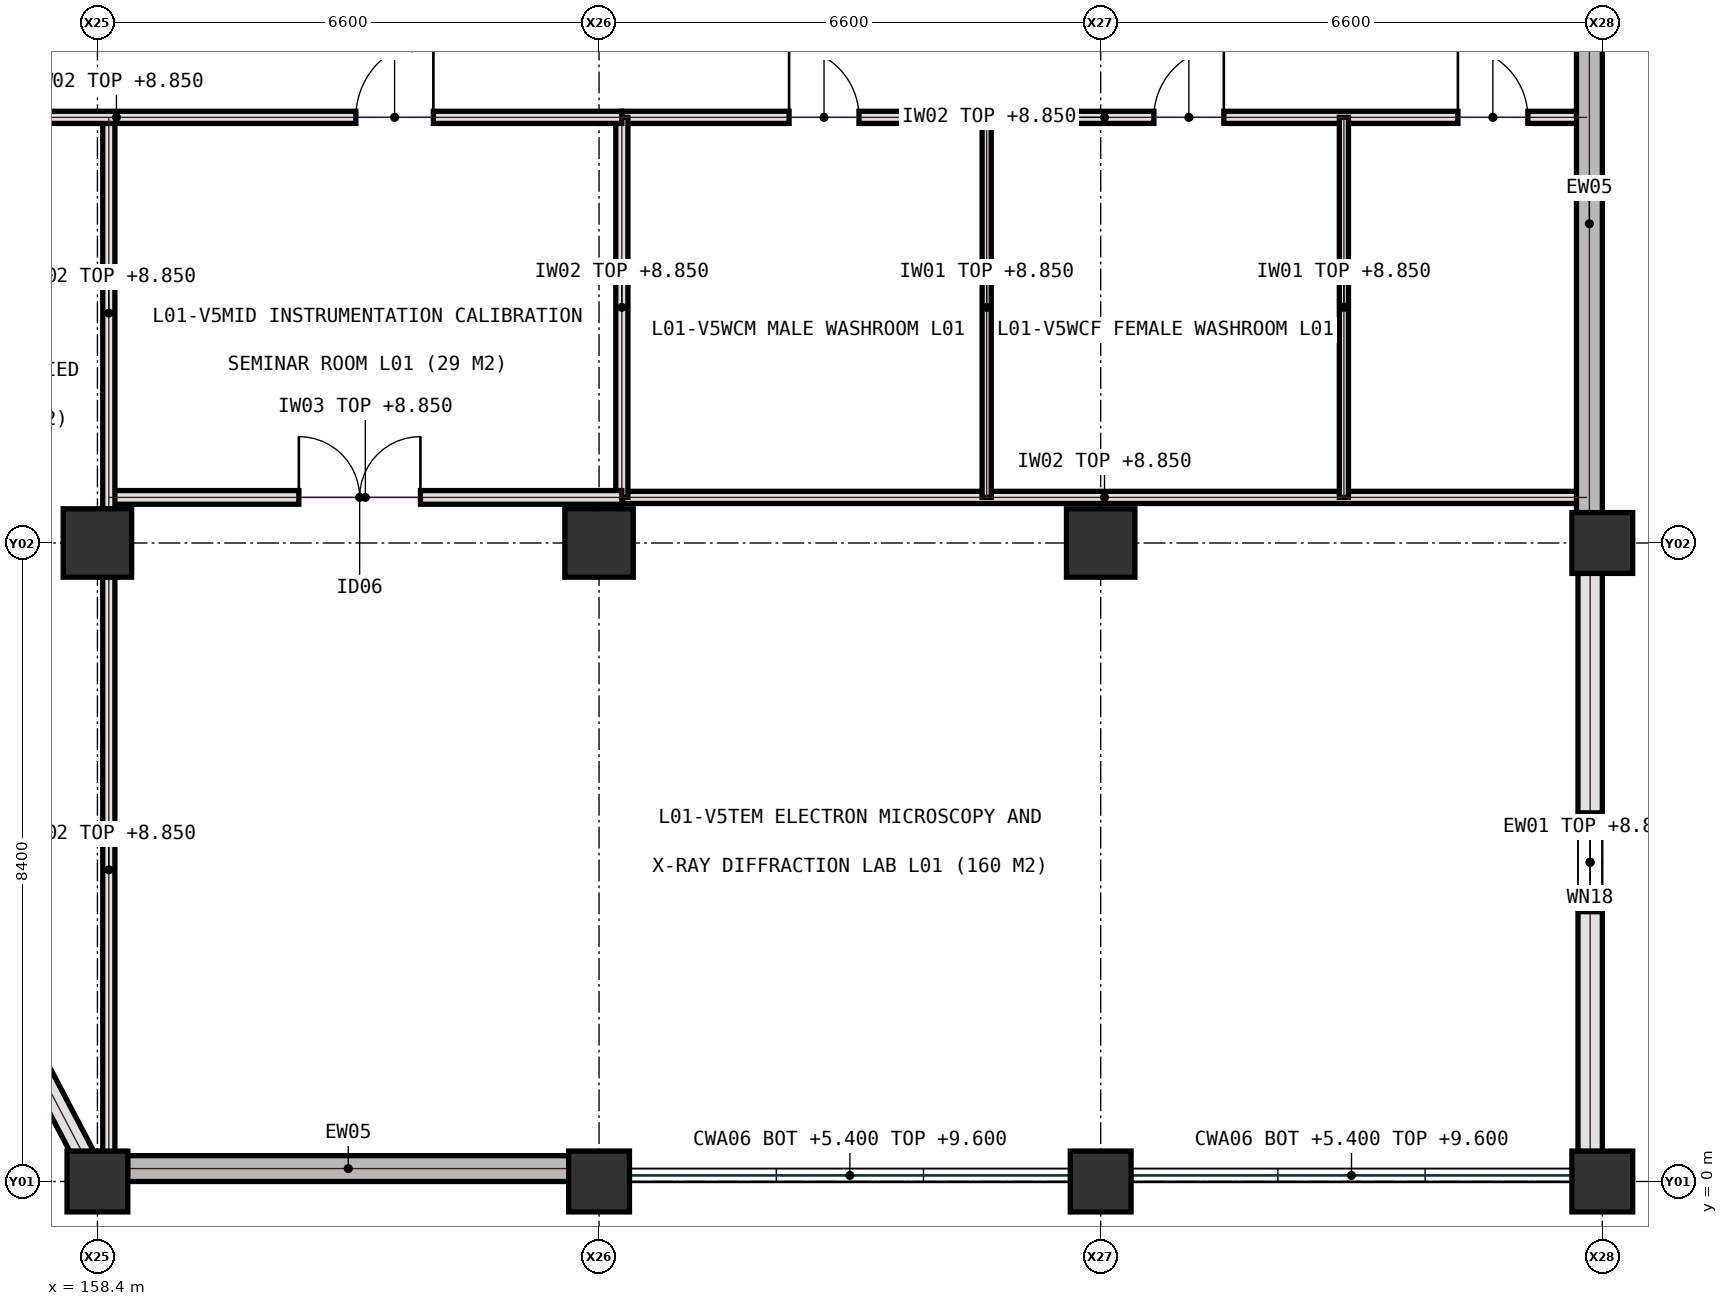
"""IFC4 building model, lengths in metres.
Left out: names, types, materials, properties, quantities, classifications, styles, units other than length and angle.
Written with IfcOpenShell. Run it as: python <this file> out.ifc"""

import sys

from ifc_helpers import new_model, si_unit, direction, frame, frame_2d, origin, origin_2d, place, context, subcontext, project, spatial, rectangle, extrude, element, fill, save


model = new_model("IFC4")
c1 = context("Model", 3, precision=1e-05, world=origin(), true_north=direction((0.0, 1.0)))
c2 = subcontext(c1, "Body", "Model", "MODEL_VIEW")
j1 = project(units=[si_unit("LENGTHUNIT", "METRE"), si_unit("PLANEANGLEUNIT", "RADIAN")], contexts=[c1])
p1 = place(None, origin())
s1 = spatial("IfcSite", under=j1, at=p1, CompositionType="ELEMENT")
p2 = place(p1, origin())
s2 = spatial("IfcBuilding", under=s1, at=p2, CompositionType="ELEMENT")
p3 = place(p2, frame((0.0, 0.0, 5.4)))
s3 = spatial("IfcBuildingStorey", under=s2, at=p3, CompositionType="ELEMENT", Elevation=5.4)
p4 = place(p3, frame((158.4, 0.0, 0.0), z_axis=(0.0, 0.0, 1.0), x_axis=(1.0, 0.0, 0.0)))
e1 = element("IfcColumn", 1, at=p4, inside=s3, PredefinedType="COLUMN", context=c2, shape_type="SweptSolid", body=[
    extrude(rectangle(XDim=0.8, YDim=0.8, at=origin_2d()), origin(), (0.0, 0.0, 1.0), 4.5),
])
p5 = place(p3, frame((158.4, 8.4, 0.0), z_axis=(0.0, 0.0, 1.0), x_axis=(1.0, 0.0, 0.0)))
e2 = element("IfcColumn", 2, at=p5, inside=s3, PredefinedType="COLUMN", context=c2, shape_type="SweptSolid", body=[
    extrude(rectangle(XDim=0.9, YDim=0.9, at=origin_2d()), origin(), (0.0, 0.0, 1.0), 4.5),
])
p6 = place(p3, frame((165.0, 0.0, 0.0), z_axis=(0.0, 0.0, 1.0), x_axis=(1.0, 0.0, 0.0)))
e3 = element("IfcColumn", 3, at=p6, inside=s3, PredefinedType="COLUMN", context=c2, shape_type="SweptSolid", body=[
    extrude(rectangle(XDim=0.8, YDim=0.8, at=origin_2d()), origin(), (0.0, 0.0, 1.0), 4.5),
])
p7 = place(p3, frame((165.0, 8.4, 0.0), z_axis=(0.0, 0.0, 1.0), x_axis=(1.0, 0.0, 0.0)))
e4 = element("IfcColumn", 4, at=p7, inside=s3, PredefinedType="COLUMN", context=c2, shape_type="SweptSolid", body=[
    extrude(rectangle(XDim=0.9, YDim=0.9, at=origin_2d()), origin(), (0.0, 0.0, 1.0), 4.5),
])
p8 = place(p3, frame((171.6, 0.0, 0.0), z_axis=(0.0, 0.0, 1.0), x_axis=(1.0, 0.0, 0.0)))
e5 = element("IfcColumn", 5, at=p8, inside=s3, PredefinedType="COLUMN", context=c2, shape_type="SweptSolid", body=[
    extrude(rectangle(XDim=0.8, YDim=0.8, at=origin_2d()), origin(), (0.0, 0.0, 1.0), 4.5),
])
p9 = place(p3, frame((171.6, 8.4, 0.0), z_axis=(0.0, 0.0, 1.0), x_axis=(1.0, 0.0, 0.0)))
e6 = element("IfcColumn", 6, at=p9, inside=s3, PredefinedType="COLUMN", context=c2, shape_type="SweptSolid", body=[
    extrude(rectangle(XDim=0.9, YDim=0.9, at=origin_2d()), origin(), (0.0, 0.0, 1.0), 4.5),
])
for number, where, z_axis, x_axis in (
    (7, (178.2, 0.0, 0.0), (0.0, 0.0, 1.0), (1.0, 0.0, 0.0)),
    (8, (178.2, 8.4, 0.0), (0.0, 0.0, 1.0), (1.0, 0.0, 0.0)),
):
    element("IfcColumn", number, at=place(p3, frame(where, z_axis=z_axis, x_axis=x_axis)), inside=s3, PredefinedType="COLUMN", context=c2, shape_type="SweptSolid", body=[
        extrude(rectangle(XDim=0.8, YDim=0.8, at=origin_2d()), origin(), (0.0, 0.0, 1.0), 4.5),
    ])
p10 = place(p3, frame((165.3, 14.0, 0.0), z_axis=(0.0, 0.0, 1.0), x_axis=(1.0, 0.0, 0.0)))
e9 = element("IfcWall", 9, at=p10, inside=s3, PredefinedType="PARTITIONING", context=c2, shape_type="SweptSolid", body=[
    extrude(rectangle(XDim=12.7, YDim=0.16, at=frame_2d((6.35, 0.0))), origin(), (0.0, 0.0, 1.0), 3.45),
])
p11 = place(p10, frame((2.2, 0.0, 0.0)))
e10 = element("IfcOpeningElement", 10, at=p11, cuts=e9, PredefinedType="OPENING", context=c2, shape_type="SweptSolid", body=[
    extrude(rectangle(XDim=0.92, YDim=2.08, at=frame_2d((0.46, 1.04))), frame((0.0, 0.09, 0.0), z_axis=(0.0, -1.0, 0.0), x_axis=(1.0, 0.0, 0.0)), (0.0, 0.0, 1.0), 0.18),
])
p12 = place(p10, frame((7.0, 0.0, 0.0)))
e11 = element("IfcOpeningElement", 11, at=p12, cuts=e9, PredefinedType="OPENING", context=c2, shape_type="SweptSolid", body=[
    extrude(rectangle(XDim=0.92, YDim=2.08, at=frame_2d((0.46, 1.04))), frame((0.0, 0.09, 0.0), z_axis=(0.0, -1.0, 0.0), x_axis=(1.0, 0.0, 0.0)), (0.0, 0.0, 1.0), 0.18),
])
p13 = place(p10, frame((11.0, 0.0, 0.0)))
e12 = element("IfcOpeningElement", 12, at=p13, cuts=e9, PredefinedType="OPENING", context=c2, shape_type="SweptSolid", body=[
    extrude(rectangle(XDim=0.92, YDim=2.08, at=frame_2d((0.46, 1.04))), frame((0.0, 0.09, 0.0), z_axis=(0.0, -1.0, 0.0), x_axis=(1.0, 0.0, 0.0)), (0.0, 0.0, 1.0), 0.18),
])
p14 = place(p3, frame((165.3, 9.0, 0.0), z_axis=(0.0, 0.0, 1.0), x_axis=(1.0, 0.0, 0.0)))
e13 = element("IfcWall", 13, at=p14, inside=s3, PredefinedType="PARTITIONING", context=c2, shape_type="SweptSolid", body=[
    extrude(rectangle(XDim=12.7, YDim=0.16, at=frame_2d((6.35, 0.0))), origin(), (0.0, 0.0, 1.0), 3.45),
])
p15 = place(p3, frame((165.3, 9.0, 0.0), z_axis=(0.0, 0.0, 1.0), x_axis=(0.0, 1.0, 0.0)))
e14 = element("IfcWall", 14, at=p15, inside=s3, PredefinedType="PARTITIONING", context=c2, shape_type="SweptSolid", body=[
    extrude(rectangle(XDim=5.0, YDim=0.16, at=frame_2d((2.5, 0.0))), origin(), (0.0, 0.0, 1.0), 3.45),
])
for number, where, z_axis, x_axis in (
    (15, (170.1, 9.0, 0.0), (0.0, 0.0, 1.0), (0.0, 1.0, 0.0)),
    (16, (174.8, 9.0, 0.0), (0.0, 0.0, 1.0), (0.0, 1.0, 0.0)),
):
    element("IfcWall", number, at=place(p3, frame(where, z_axis=z_axis, x_axis=x_axis)), inside=s3, PredefinedType="PARTITIONING", context=c2, shape_type="SweptSolid", body=[
        extrude(rectangle(XDim=5.0, YDim=0.12, at=frame_2d((2.5, 0.0))), origin(), (0.0, 0.0, 1.0), 3.45),
    ])
p16 = place(p3, frame((158.55, 9.0, 0.0), z_axis=(0.0, 0.0, 1.0), x_axis=(1.0, 0.0, 0.0)))
e17 = element("IfcWall", 17, at=p16, inside=s3, PredefinedType="SOLIDWALL", context=c2, shape_type="SweptSolid", body=[
    extrude(rectangle(XDim=6.75, YDim=0.18, at=frame_2d((3.375, 0.0))), origin(), (0.0, 0.0, 1.0), 3.45),
])
p17 = place(p16, frame((2.5, 0.0, 0.0)))
e18 = element("IfcOpeningElement", 18, at=p17, cuts=e17, PredefinedType="OPENING", context=c2, shape_type="SweptSolid", body=[
    extrude(rectangle(XDim=1.6, YDim=2.2, at=frame_2d((0.8, 1.1))), frame((0.0, 0.1, 0.0), z_axis=(0.0, -1.0, 0.0), x_axis=(1.0, 0.0, 0.0)), (0.0, 0.0, 1.0), 0.2),
])
p18 = place(p3, frame((158.55, 0.25, 0.0), z_axis=(0.0, 0.0, 1.0), x_axis=(0.0, 1.0, 0.0)))
e19 = element("IfcWall", 19, at=p18, inside=s3, PredefinedType="PARTITIONING", context=c2, shape_type="SweptSolid", body=[
    extrude(rectangle(XDim=7.7, YDim=0.16, at=frame_2d((3.85, 0.0))), origin(), (0.0, 0.0, 1.0), 3.45),
])
p19 = place(p3, frame((158.55, 8.85, 0.0), z_axis=(0.0, 0.0, 1.0), x_axis=(0.0, 1.0, 0.0)))
e20 = element("IfcWall", 20, at=p19, inside=s3, PredefinedType="PARTITIONING", context=c2, shape_type="SweptSolid", body=[
    extrude(rectangle(XDim=5.15, YDim=0.16, at=frame_2d((2.575, 0.0))), origin(), (0.0, 0.0, 1.0), 3.45),
])
p20 = place(p3, frame((152.0, 14.0, 0.0), z_axis=(0.0, 0.0, 1.0), x_axis=(1.0, 0.0, 0.0)))
e21 = element("IfcWall", 21, at=p20, inside=s3, PredefinedType="PARTITIONING", context=c2, shape_type="SweptSolid", body=[
    extrude(rectangle(XDim=13.3, YDim=0.16, at=frame_2d((6.65, 0.0))), origin(), (0.0, 0.0, 1.0), 3.45),
])
p21 = place(p20, frame((2.6, 0.0, 0.0)))
e22 = element("IfcOpeningElement", 22, at=p21, cuts=e21, PredefinedType="OPENING", context=c2, shape_type="SweptSolid", body=[
    extrude(rectangle(XDim=1.02, YDim=2.18, at=frame_2d((0.51, 1.09))), frame((0.0, 0.09, 0.0), z_axis=(0.0, -1.0, 0.0), x_axis=(1.0, 0.0, 0.0)), (0.0, 0.0, 1.0), 0.18),
])
p22 = place(p20, frame((9.8, 0.0, 0.0)))
e23 = element("IfcOpeningElement", 23, at=p22, cuts=e21, PredefinedType="OPENING", context=c2, shape_type="SweptSolid", body=[
    extrude(rectangle(XDim=1.02, YDim=2.18, at=frame_2d((0.51, 1.09))), frame((0.0, 0.09, 0.0), z_axis=(0.0, -1.0, 0.0), x_axis=(1.0, 0.0, 0.0)), (0.0, 0.0, 1.0), 0.18),
])
p23 = place(p3, frame((158.795, 0.17, 0.0), z_axis=(0.0, 0.0, 1.0), x_axis=(1.0, 0.0, 0.0)))
e24 = element("IfcWall", 24, at=p23, inside=s3, PredefinedType="SHEAR", context=c2, shape_type="SweptSolid", body=[
    extrude(rectangle(XDim=5.81, YDim=0.34, at=frame_2d((2.905, 0.0))), origin(), (0.0, 0.0, 1.0), 4.2),
])
p24 = place(p3, frame((178.04, 0.395, 0.0), z_axis=(0.0, 0.0, 1.0), x_axis=(0.0, 1.0, 0.0)))
e25 = element("IfcWall", 25, at=p24, inside=s3, PredefinedType="SOLIDWALL", context=c2, shape_type="SweptSolid", body=[
    extrude(rectangle(XDim=7.61, YDim=0.32, at=frame_2d((3.805, 0.0))), origin(), (0.0, 0.0, 1.0), 3.485),
])
p25 = place(p24, frame((3.155, 0.0, 0.95)))
e26 = element("IfcOpeningElement", 26, at=p25, cuts=e25, PredefinedType="OPENING", context=c2, shape_type="SweptSolid", body=[
    extrude(rectangle(XDim=1.3, YDim=1.75, at=frame_2d((0.65, 0.875))), frame((0.0, 0.17, 0.0), z_axis=(0.0, -1.0, 0.0), x_axis=(1.0, 0.0, 0.0)), (0.0, 0.0, 1.0), 0.34),
])
p26 = place(p3, frame((178.03, 8.795, 0.0), z_axis=(0.0, 0.0, 1.0), x_axis=(0.0, 1.0, 0.0)))
e27 = element("IfcWall", 27, at=p26, inside=s3, PredefinedType="SHEAR", context=c2, shape_type="SweptSolid", body=[
    extrude(rectangle(XDim=7.61, YDim=0.34, at=frame_2d((3.805, 0.0))), origin(), (0.0, 0.0, 1.0), 4.2),
])
p27 = place(p3, frame((155.25, 6.01, 0.0), z_axis=(0.0, 0.0, 1.0), x_axis=(0.464471613901, -0.885588007981, 0.0)))
e28 = element("IfcWall", 28, at=p27, inside=s3, PredefinedType="SOLIDWALL", context=c2, shape_type="SweptSolid", body=[
    extrude(rectangle(XDim=6.459, YDim=0.28, at=frame_2d((3.229, 0.0))), origin(), (0.0, 0.0, 1.0), 3.585),
])
p28 = place(p27, frame((2.03, 0.0, 0.95)))
e29 = element("IfcOpeningElement", 29, at=p28, cuts=e28, PredefinedType="OPENING", context=c2, shape_type="SweptSolid", body=[
    extrude(rectangle(XDim=2.4, YDim=1.6, at=frame_2d((1.2, 0.8))), frame((0.0, 0.15, 0.0), z_axis=(0.0, -1.0, 0.0), x_axis=(1.0, 0.0, 0.0)), (0.0, 0.0, 1.0), 0.3),
])
p29 = place(p11, origin())
e30 = element("IfcDoor", 30, at=p29, inside=s3, OperationType="SINGLE_SWING_LEFT", PredefinedType="DOOR", context=c2, shape_type="SweptSolid", body=[
    extrude(rectangle(XDim=0.92, YDim=2.08, at=frame_2d((0.46, 1.04))), frame((0.0, 0.025, 0.0), z_axis=(0.0, -1.0, 0.0), x_axis=(1.0, 0.0, 0.0)), (0.0, 0.0, 1.0), 0.05),
])
fill(e10, e30)
p30 = place(p12, origin())
e31 = element("IfcDoor", 31, at=p30, inside=s3, OperationType="SINGLE_SWING_RIGHT", PredefinedType="DOOR", context=c2, shape_type="SweptSolid", body=[
    extrude(rectangle(XDim=0.92, YDim=2.08, at=frame_2d((0.46, 1.04))), frame((0.0, 0.025, 0.0), z_axis=(0.0, -1.0, 0.0), x_axis=(1.0, 0.0, 0.0)), (0.0, 0.0, 1.0), 0.05),
])
fill(e11, e31)
p31 = place(p13, origin())
e32 = element("IfcDoor", 32, at=p31, inside=s3, OperationType="SINGLE_SWING_LEFT", PredefinedType="DOOR", context=c2, shape_type="SweptSolid", body=[
    extrude(rectangle(XDim=0.92, YDim=2.08, at=frame_2d((0.46, 1.04))), frame((0.0, 0.025, 0.0), z_axis=(0.0, -1.0, 0.0), x_axis=(1.0, 0.0, 0.0)), (0.0, 0.0, 1.0), 0.05),
])
fill(e12, e32)
p32 = place(p17, origin())
e33 = element("IfcDoor", 33, at=p32, inside=s3, OperationType="DOUBLE_DOOR_SINGLE_SWING", PredefinedType="DOOR", context=c2, shape_type="SweptSolid", body=[
    extrude(rectangle(XDim=1.6, YDim=2.2, at=frame_2d((0.8, 1.1))), frame((0.0, 0.025, 0.0), z_axis=(0.0, -1.0, 0.0), x_axis=(1.0, 0.0, 0.0)), (0.0, 0.0, 1.0), 0.05),
])
fill(e18, e33)
p33 = place(p22, origin())
e34 = element("IfcDoor", 34, at=p33, inside=s3, OperationType="SINGLE_SWING_RIGHT", PredefinedType="DOOR", context=c2, shape_type="SweptSolid", body=[
    extrude(rectangle(XDim=1.02, YDim=2.18, at=frame_2d((0.51, 1.09))), frame((0.0, 0.025, 0.0), z_axis=(0.0, -1.0, 0.0), x_axis=(1.0, 0.0, 0.0)), (0.0, 0.0, 1.0), 0.05),
])
fill(e23, e34)
p34 = place(p25, origin())
e35 = element("IfcWindow", 35, at=p34, inside=s3, PartitioningType="SINGLE_PANEL", PredefinedType="WINDOW", context=c2, shape_type="SweptSolid", body=[
    extrude(rectangle(XDim=1.3, YDim=1.75, at=frame_2d((0.65, 0.875))), frame((0.0, 0.03, 0.0), z_axis=(0.0, -1.0, 0.0), x_axis=(1.0, 0.0, 0.0)), (0.0, 0.0, 1.0), 0.06),
])
fill(e26, e35)
save(model, sys.argv[1])
